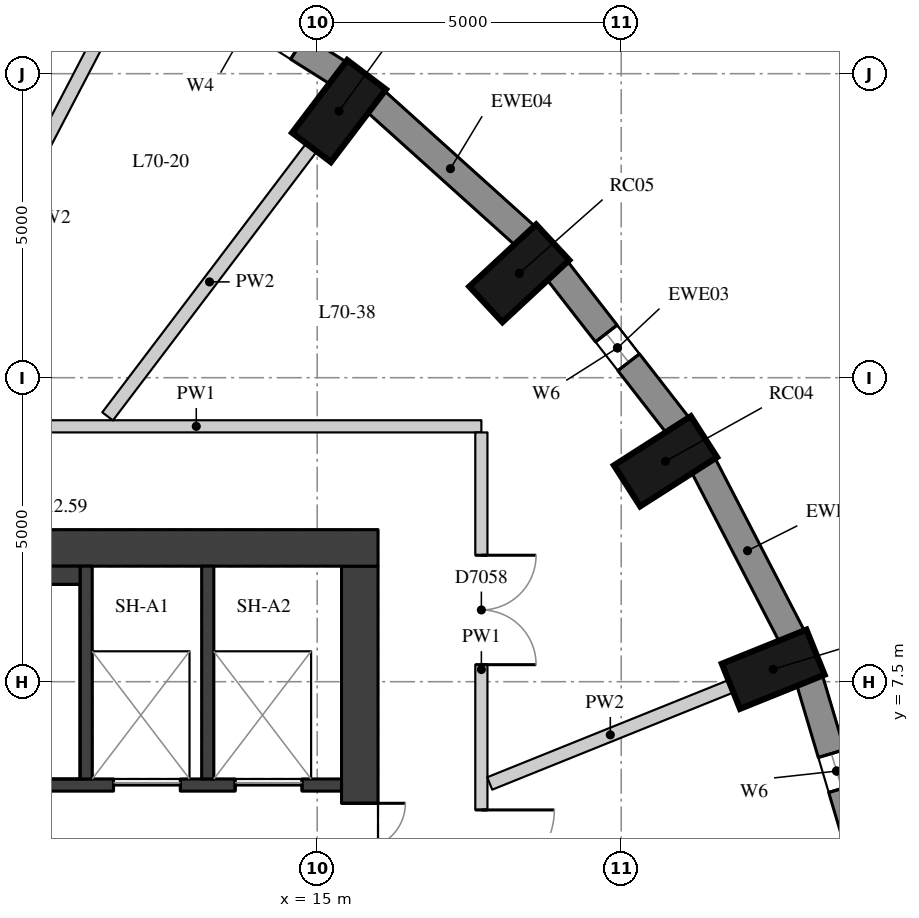
"""IFC4 building model, lengths in metres.
Left out: names, types, materials, properties, quantities, classifications, styles, units other than length and angle.
Written with IfcOpenShell. Run it as: python <this file> out.ifc"""

import sys

from ifc_helpers import new_model, si_unit, direction, frame, frame_2d, origin, origin_2d, place, context, subcontext, project, spatial, rectangle, extrude, element, fill, save


model = new_model("IFC4")
c1 = context("Model", 3, precision=1e-05, world=origin(), true_north=direction((0.0, 1.0)))
c2 = subcontext(c1, "Body", "Model", "MODEL_VIEW")
j1 = project(units=[si_unit("LENGTHUNIT", "METRE"), si_unit("PLANEANGLEUNIT", "RADIAN")], contexts=[c1])
p1 = place(None, origin())
s1 = spatial("IfcSite", under=j1, at=p1, CompositionType="ELEMENT")
p2 = place(p1, origin())
s2 = spatial("IfcBuilding", under=s1, at=p2, CompositionType="ELEMENT")
p3 = place(p2, frame((0.0, 0.0, 246.5)))
s3 = spatial("IfcBuildingStorey", under=s2, at=p3, CompositionType="ELEMENT", Elevation=246.5)
for number, where, z_axis, x_axis in (
    (1, (22.5, 7.705, 0.0), (0.0, 0.0, 1.0), (0.928, 0.374, 0.0)),
    (2, (20.728, 11.125, 0.0), (0.0, 0.0, 1.0), (0.843, 0.539, 0.0)),
    (3, (18.323, 14.216, 0.0), (0.0, 0.0, 1.0), (0.733, 0.681, 0.0)),
    (4, (15.359, 16.885, 0.0), (0.0, 0.0, 1.0), (0.604, 0.797, 0.0)),
):
    element("IfcColumn", number, at=place(p3, frame(where, z_axis=z_axis, x_axis=x_axis)), inside=s3, PredefinedType="COLUMN", context=c2, shape_type="SweptSolid", body=[
        extrude(rectangle(XDim=1.5, YDim=0.8, at=origin_2d()), origin(), (0.0, 0.0, 1.0), 3.3),
    ])
p4 = place(p3, frame((23.99, 4.526, 0.0), z_axis=(0.0, 0.0, 1.0), x_axis=(-0.285263800865, 0.958449040855, 0.0)))
e5 = element("IfcWall", 5, at=p4, inside=s3, PredefinedType="SOLIDWALL", context=c2, shape_type="SweptSolid", body=[
    extrude(rectangle(XDim=3.139, YDim=0.45, at=frame_2d((1.57, 0.0))), origin(), (0.0, 0.0, 1.0), 3.02),
])
p5 = place(p4, frame((1.27, 0.0, 0.4)))
e6 = element("IfcOpeningElement", 6, at=p5, cuts=e5, PredefinedType="OPENING", context=c2, shape_type="SweptSolid", body=[
    extrude(rectangle(XDim=0.6, YDim=1.75, at=frame_2d((0.3, 0.875))), frame((0.0, 0.235, 0.0), z_axis=(0.0, -1.0, 0.0), x_axis=(1.0, 0.0, 0.0)), (0.0, 0.0, 1.0), 0.47),
])
p6 = place(p3, frame((22.81, 8.24, 0.0), z_axis=(0.0, 0.0, 1.0), x_axis=(-0.459889857669, 0.887975967475, 0.0)))
e7 = element("IfcWall", 7, at=p6, inside=s3, PredefinedType="SOLIDWALL", context=c2, shape_type="SweptSolid", body=[
    extrude(rectangle(XDim=3.186, YDim=0.45, at=frame_2d((1.593, 0.0))), origin(), (0.0, 0.0, 1.0), 3.02),
])
p7 = place(p3, frame((20.935, 11.708, 0.0), z_axis=(0.0, 0.0, 1.0), x_axis=(-0.613862536705, 0.789412937587, 0.0)))
e8 = element("IfcWall", 8, at=p7, inside=s3, PredefinedType="SOLIDWALL", context=c2, shape_type="SweptSolid", body=[
    extrude(rectangle(XDim=3.247, YDim=0.45, at=frame_2d((1.624, 0.0))), origin(), (0.0, 0.0, 1.0), 3.02),
])
p8 = place(p7, frame((1.324, 0.0, 0.4)))
e9 = element("IfcOpeningElement", 9, at=p8, cuts=e8, PredefinedType="OPENING", context=c2, shape_type="SweptSolid", body=[
    extrude(rectangle(XDim=0.6, YDim=1.75, at=frame_2d((0.3, 0.875))), frame((0.0, 0.235, 0.0), z_axis=(0.0, -1.0, 0.0), x_axis=(1.0, 0.0, 0.0)), (0.0, 0.0, 1.0), 0.47),
])
p9 = place(p3, frame((18.424, 14.828, 0.0), z_axis=(0.0, 0.0, 1.0), x_axis=(-0.743166014219, 0.669107073128, 0.0)))
e10 = element("IfcWall", 10, at=p9, inside=s3, PredefinedType="SOLIDWALL", context=c2, shape_type="SweptSolid", body=[
    extrude(rectangle(XDim=3.316, YDim=0.45, at=frame_2d((1.658, 0.0))), origin(), (0.0, 0.0, 1.0), 3.02),
])
p10 = place(p3, frame((15.353, 17.506, 0.0), z_axis=(0.0, 0.0, 1.0), x_axis=(-0.845929139811, 0.53329531258, 0.0)))
e11 = element("IfcWall", 11, at=p10, inside=s3, PredefinedType="SOLIDWALL", context=c2, shape_type="SweptSolid", body=[
    extrude(rectangle(XDim=3.385, YDim=0.45, at=frame_2d((1.692, 0.0))), origin(), (0.0, 0.0, 1.0), 3.02),
])
p11 = place(p10, frame((0.792, 0.0, 0.4)))
e12 = element("IfcOpeningElement", 12, at=p11, cuts=e11, PredefinedType="OPENING", context=c2, shape_type="SweptSolid", body=[
    extrude(rectangle(XDim=1.8, YDim=1.75, at=frame_2d((0.9, 0.875))), frame((0.0, 0.235, 0.0), z_axis=(0.0, -1.0, 0.0), x_axis=(1.0, 0.0, 0.0)), (0.0, 0.0, 1.0), 0.47),
])
p12 = place(p3, frame((15.7, -9.4, 0.0), z_axis=(0.0, 0.0, 1.0), x_axis=(0.0, 1.0, 0.0)))
e13 = element("IfcWall", 13, at=p12, inside=s3, PredefinedType="SHEAR", context=c2, shape_type="SweptSolid", body=[
    extrude(rectangle(XDim=18.8, YDim=0.6, at=frame_2d((9.4, 0.0))), origin(), (0.0, 0.0, 1.0), 3.02),
])
p13 = place(p12, frame((13.4, 0.0, 0.0)))
e14 = element("IfcOpeningElement", 14, at=p13, cuts=e13, PredefinedType="OPENING", context=c2, shape_type="SweptSolid", body=[
    extrude(rectangle(XDim=1.5, YDim=2.1, at=frame_2d((0.75, 1.05))), frame((0.0, 0.31, 0.0), z_axis=(0.0, -1.0, 0.0), x_axis=(1.0, 0.0, 0.0)), (0.0, 0.0, 1.0), 0.62),
])
p14 = place(p12, frame((3.9, 0.0, 0.0)))
e15 = element("IfcOpeningElement", 15, at=p14, cuts=e13, PredefinedType="OPENING", context=c2, shape_type="SweptSolid", body=[
    extrude(rectangle(XDim=1.5, YDim=2.1, at=frame_2d((0.75, 1.05))), frame((0.0, 0.31, 0.0), z_axis=(0.0, -1.0, 0.0), x_axis=(1.0, 0.0, 0.0)), (0.0, 0.0, 1.0), 0.62),
])
p15 = place(p3, frame((4.0, 9.7, 0.0), z_axis=(0.0, 0.0, 1.0), x_axis=(1.0, 0.0, 0.0)))
e16 = element("IfcWall", 16, at=p15, inside=s3, PredefinedType="SHEAR", context=c2, shape_type="SweptSolid", body=[
    extrude(rectangle(XDim=12.0, YDim=0.6, at=frame_2d((6.0, 0.0))), origin(), (0.0, 0.0, 1.0), 3.02),
])
p16 = place(p3, frame((4.6, 5.8, 0.0), z_axis=(0.0, 0.0, 1.0), x_axis=(1.0, 0.0, 0.0)))
e17 = element("IfcWall", 17, at=p16, inside=s3, PredefinedType="SHEAR", context=c2, shape_type="SweptSolid", body=[
    extrude(rectangle(XDim=10.8, YDim=0.2, at=frame_2d((5.4, 0.0))), origin(), (0.0, 0.0, 1.0), 3.02),
])
p17 = place(p16, frame((7.05, 0.0, 0.0)))
e18 = element("IfcOpeningElement", 18, at=p17, cuts=e17, PredefinedType="OPENING", context=c2, shape_type="SweptSolid", body=[
    extrude(rectangle(XDim=1.1, YDim=2.1, at=frame_2d((0.55, 1.05))), frame((0.0, 0.11, 0.0), z_axis=(0.0, -1.0, 0.0), x_axis=(1.0, 0.0, 0.0)), (0.0, 0.0, 1.0), 0.22),
])
p18 = place(p16, frame((9.05, 0.0, 0.0)))
e19 = element("IfcOpeningElement", 19, at=p18, cuts=e17, PredefinedType="OPENING", context=c2, shape_type="SweptSolid", body=[
    extrude(rectangle(XDim=1.1, YDim=2.1, at=frame_2d((0.55, 1.05))), frame((0.0, 0.11, 0.0), z_axis=(0.0, -1.0, 0.0), x_axis=(1.0, 0.0, 0.0)), (0.0, 0.0, 1.0), 0.22),
])
for number, where, z_axis, x_axis in (
    (20, (11.2, 5.9, 0.0), (0.0, 0.0, 1.0), (0.0, 1.0, 0.0)),
    (21, (13.2, 5.9, 0.0), (0.0, 0.0, 1.0), (0.0, 1.0, 0.0)),
):
    element("IfcWall", number, at=place(p3, frame(where, z_axis=z_axis, x_axis=x_axis)), inside=s3, PredefinedType="SHEAR", context=c2, shape_type="SweptSolid", body=[
        extrude(rectangle(XDim=3.5, YDim=0.2, at=frame_2d((1.75, 0.0))), origin(), (0.0, 0.0, 1.0), 3.02),
    ])
p19 = place(p3, frame((6.22, 9.25, 0.0), z_axis=(0.0, 0.0, 1.0), x_axis=(1.0, 0.0, 0.0)))
e22 = element("IfcWall", 22, at=p19, inside=s3, PredefinedType="PARTITIONING", context=c2, shape_type="SweptSolid", body=[
    extrude(rectangle(XDim=4.88, YDim=0.3, at=frame_2d((2.44, 0.0))), origin(), (0.0, 0.0, 1.0), 3.02),
])
p20 = place(p3, frame((8.322, 11.7, 0.0), z_axis=(0.0, 0.0, 1.0), x_axis=(1.0, 0.0, 0.0)))
e23 = element("IfcWall", 23, at=p20, inside=s3, PredefinedType="PARTITIONING", context=c2, shape_type="SweptSolid", body=[
    extrude(rectangle(XDim=9.378, YDim=0.2, at=frame_2d((4.689, 0.0))), origin(), (0.0, 0.0, 1.0), 3.02),
])
p21 = place(p20, frame((1.002, 0.0, 0.0)))
e24 = element("IfcOpeningElement", 24, at=p21, cuts=e23, PredefinedType="OPENING", context=c2, shape_type="SweptSolid", body=[
    extrude(rectangle(XDim=0.9, YDim=2.1, at=frame_2d((0.45, 1.05))), frame((0.0, 0.11, 0.0), z_axis=(0.0, -1.0, 0.0), x_axis=(1.0, 0.0, 0.0)), (0.0, 0.0, 1.0), 0.22),
])
p22 = place(p3, frame((17.7, 11.6, 0.0), z_axis=(0.0, 0.0, 1.0), x_axis=(0.0, -1.0, 0.0)))
e25 = element("IfcWall", 25, at=p22, inside=s3, PredefinedType="PARTITIONING", context=c2, shape_type="SweptSolid", body=[
    extrude(rectangle(XDim=7.8, YDim=0.2, at=frame_2d((3.9, 0.0))), origin(), (0.0, 0.0, 1.0), 3.02),
])
p23 = place(p22, frame((6.209, 0.0, 0.0)))
e26 = element("IfcOpeningElement", 26, at=p23, cuts=e25, PredefinedType="OPENING", context=c2, shape_type="SweptSolid", body=[
    extrude(rectangle(XDim=1.2, YDim=2.1, at=frame_2d((0.6, 1.05))), frame((0.0, 0.11, 0.0), z_axis=(0.0, -1.0, 0.0), x_axis=(1.0, 0.0, 0.0)), (0.0, 0.0, 1.0), 0.22),
])
p24 = place(p22, frame((2.02, 0.0, 0.0)))
e27 = element("IfcOpeningElement", 27, at=p24, cuts=e25, PredefinedType="OPENING", context=c2, shape_type="SweptSolid", body=[
    extrude(rectangle(XDim=1.8, YDim=2.1, at=frame_2d((0.9, 1.05))), frame((0.0, 0.11, 0.0), z_axis=(0.0, -1.0, 0.0), x_axis=(1.0, 0.0, 0.0)), (0.0, 0.0, 1.0), 0.22),
])
p25 = place(p3, frame((21.804, 7.424, 0.0), z_axis=(0.0, 0.0, 1.0), x_axis=(-0.927552565226, -0.373692706301, 0.0)))
e28 = element("IfcWall", 28, at=p25, inside=s3, PredefinedType="PARTITIONING", context=c2, shape_type="SweptSolid", body=[
    extrude(rectangle(XDim=4.277, YDim=0.22, at=frame_2d((2.138, 0.0))), origin(), (0.0, 0.0, 1.0), 3.02),
])
p26 = place(p3, frame((14.906, 16.287, 0.0), z_axis=(0.0, 0.0, 1.0), x_axis=(-0.604066831727, -0.796933662739, 0.0)))
e29 = element("IfcWall", 29, at=p26, inside=s3, PredefinedType="PARTITIONING", context=c2, shape_type="SweptSolid", body=[
    extrude(rectangle(XDim=5.551, YDim=0.22, at=frame_2d((2.775, 0.0))), origin(), (0.0, 0.0, 1.0), 3.02),
])
p27 = place(p3, frame((11.578, 18.385, 0.0), z_axis=(0.0, 0.0, 1.0), x_axis=(-0.462372875873, -0.886685583314, 0.0)))
e30 = element("IfcWall", 30, at=p27, inside=s3, PredefinedType="PARTITIONING", context=c2, shape_type="SweptSolid", body=[
    extrude(rectangle(XDim=7.345, YDim=0.22, at=frame_2d((3.672, 0.0))), origin(), (0.0, 0.0, 1.0), 3.02),
])
p28 = place(p5, origin())
e31 = element("IfcWindow", 31, at=p28, inside=s3, PartitioningType="SINGLE_PANEL", PredefinedType="WINDOW", context=c2, shape_type="SweptSolid", body=[
    extrude(rectangle(XDim=0.6, YDim=1.75, at=frame_2d((0.3, 0.875))), frame((0.0, 0.035, 0.0), z_axis=(0.0, -1.0, 0.0), x_axis=(1.0, 0.0, 0.0)), (0.0, 0.0, 1.0), 0.06),
])
fill(e6, e31)
p29 = place(p8, origin())
e32 = element("IfcWindow", 32, at=p29, inside=s3, PartitioningType="SINGLE_PANEL", PredefinedType="WINDOW", context=c2, shape_type="SweptSolid", body=[
    extrude(rectangle(XDim=0.6, YDim=1.75, at=frame_2d((0.3, 0.875))), frame((0.0, 0.035, 0.0), z_axis=(0.0, -1.0, 0.0), x_axis=(1.0, 0.0, 0.0)), (0.0, 0.0, 1.0), 0.06),
])
fill(e9, e32)
p30 = place(p13, origin())
e33 = element("IfcDoor", 33, at=p30, inside=s3, OperationType="DOUBLE_DOOR_SINGLE_SWING", PredefinedType="DOOR", context=c2, shape_type="SweptSolid", body=[
    extrude(rectangle(XDim=1.5, YDim=2.1, at=frame_2d((0.75, 1.05))), frame((0.0, 0.025, 0.0), z_axis=(0.0, -1.0, 0.0), x_axis=(1.0, 0.0, 0.0)), (0.0, 0.0, 1.0), 0.05),
])
fill(e14, e33)
p31 = place(p17, origin())
e34 = element("IfcDoor", 34, at=p31, inside=s3, OperationType="DOUBLE_DOOR_SLIDING", PredefinedType="DOOR", context=c2, shape_type="SweptSolid", body=[
    extrude(rectangle(XDim=1.1, YDim=2.1, at=frame_2d((0.55, 1.05))), frame((0.0, 0.025, 0.0), z_axis=(0.0, -1.0, 0.0), x_axis=(1.0, 0.0, 0.0)), (0.0, 0.0, 1.0), 0.05),
])
fill(e18, e34)
p32 = place(p18, origin())
e35 = element("IfcDoor", 35, at=p32, inside=s3, OperationType="DOUBLE_DOOR_SLIDING", PredefinedType="DOOR", context=c2, shape_type="SweptSolid", body=[
    extrude(rectangle(XDim=1.1, YDim=2.1, at=frame_2d((0.55, 1.05))), frame((0.0, 0.025, 0.0), z_axis=(0.0, -1.0, 0.0), x_axis=(1.0, 0.0, 0.0)), (0.0, 0.0, 1.0), 0.05),
])
fill(e19, e35)
p33 = place(p23, origin())
e36 = element("IfcDoor", 36, at=p33, inside=s3, OperationType="SINGLE_SWING_LEFT", PredefinedType="DOOR", context=c2, shape_type="SweptSolid", body=[
    extrude(rectangle(XDim=1.2, YDim=2.1, at=frame_2d((0.6, 1.05))), frame((0.0, 0.025, 0.0), z_axis=(0.0, -1.0, 0.0), x_axis=(1.0, 0.0, 0.0)), (0.0, 0.0, 1.0), 0.05),
])
fill(e26, e36)
p34 = place(p24, origin())
e37 = element("IfcDoor", 37, at=p34, inside=s3, OperationType="DOUBLE_DOOR_SINGLE_SWING", PredefinedType="DOOR", context=c2, shape_type="SweptSolid", body=[
    extrude(rectangle(XDim=1.8, YDim=2.1, at=frame_2d((0.9, 1.05))), frame((0.0, 0.025, 0.0), z_axis=(0.0, -1.0, 0.0), x_axis=(1.0, 0.0, 0.0)), (0.0, 0.0, 1.0), 0.05),
])
fill(e27, e37)
save(model, sys.argv[1])
